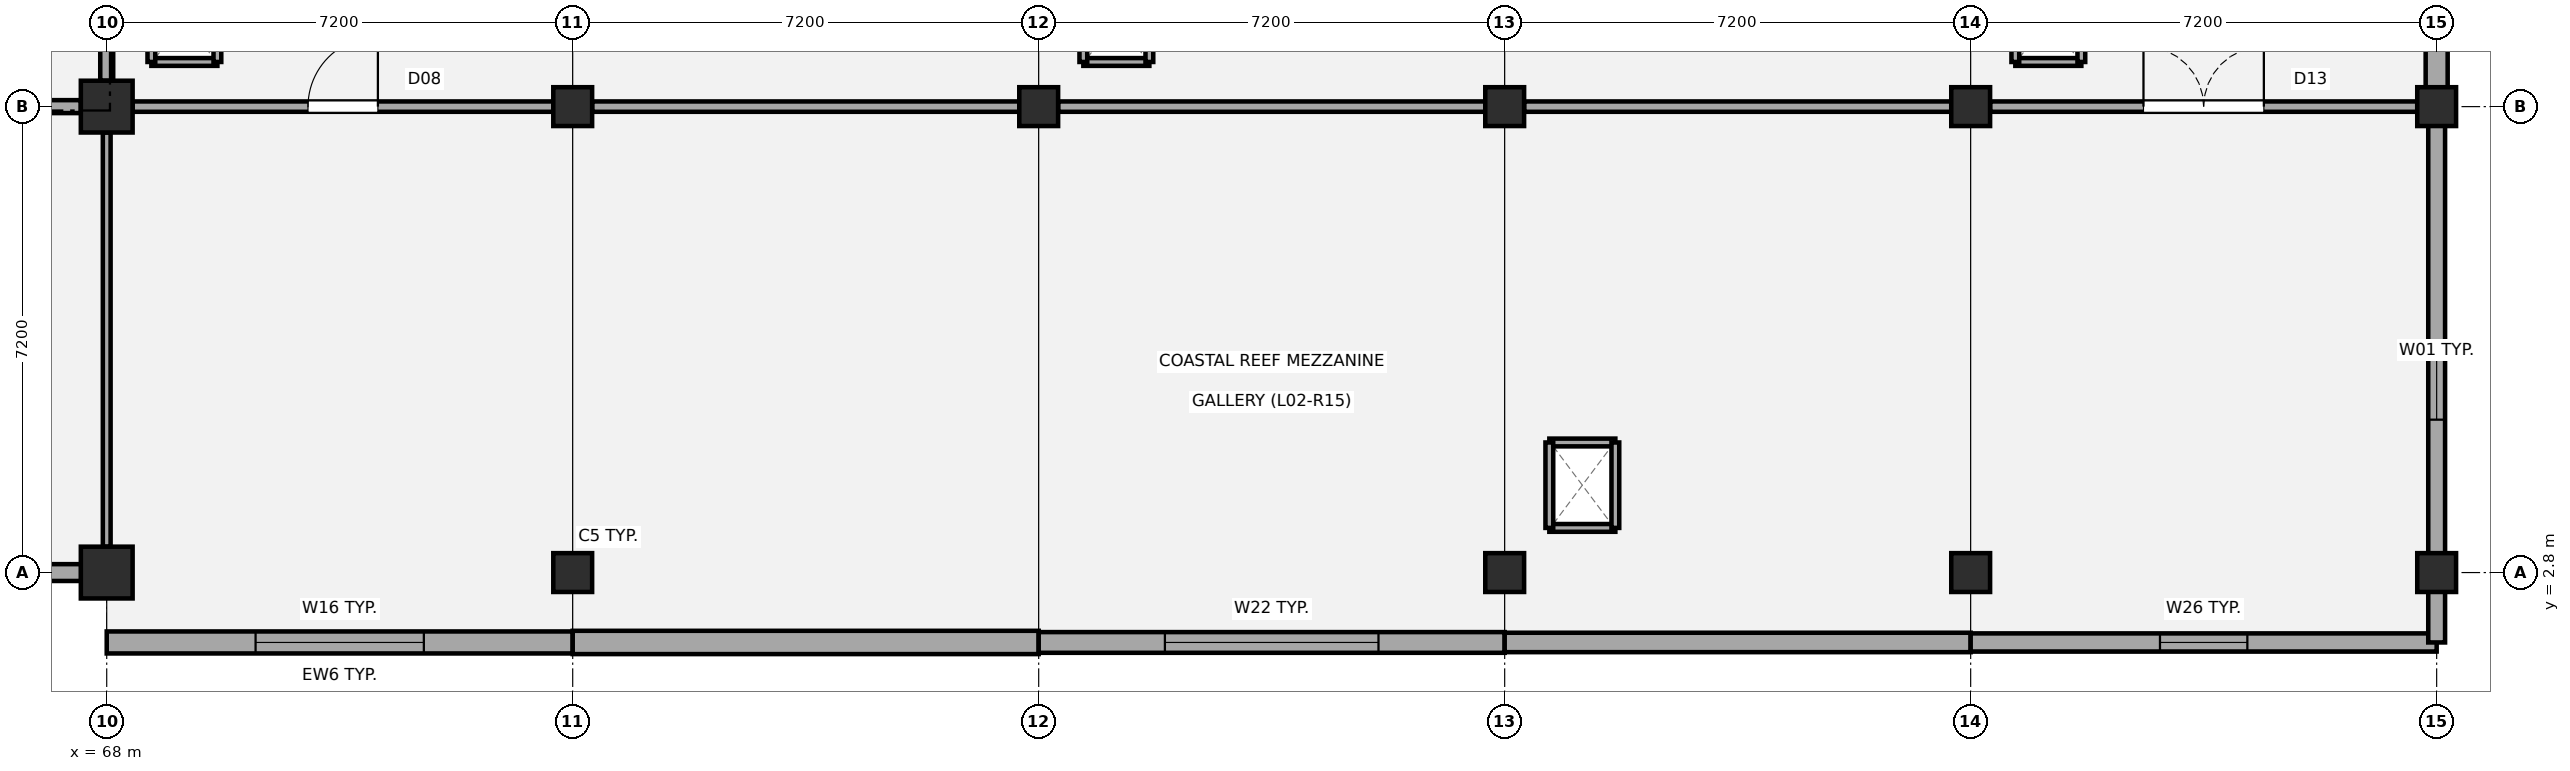
"""IFC4 building model, lengths in metres.
Left out: names, types, materials, properties, quantities, classifications, styles, units other than length and angle.
Written with IfcOpenShell. Run it as: python <this file> out.ifc"""

import sys

from ifc_helpers import new_model, si_unit, direction, frame, frame_2d, origin, origin_2d, place, context, subcontext, project, spatial, rectangle, extrude, element, fill, save


model = new_model("IFC4")
c1 = context("Model", 3, precision=1e-05, world=origin(), true_north=direction((0.0, 1.0)))
c2 = subcontext(c1, "Body", "Model", "MODEL_VIEW")
j1 = project(units=[si_unit("LENGTHUNIT", "METRE"), si_unit("PLANEANGLEUNIT", "RADIAN")], contexts=[c1])
p1 = place(None, origin())
s1 = spatial("IfcSite", under=j1, at=p1, CompositionType="ELEMENT")
p2 = place(p1, origin())
s2 = spatial("IfcBuilding", under=s1, at=p2, CompositionType="ELEMENT")
p3 = place(p2, frame((0.0, 0.0, 9.18)))
s3 = spatial("IfcBuildingStorey", under=s2, at=p3, CompositionType="ELEMENT", Elevation=9.18)
for number, where, z_axis, x_axis in (
    (1, (68.0, 2.8, 0.0), (0.0, 0.0, 1.0), (1.0, 0.0, 0.0)),
    (2, (68.0, 10.0, 0.0), (0.0, 0.0, 1.0), (1.0, 0.0, 0.0)),
):
    element("IfcColumn", number, at=place(p3, frame(where, z_axis=z_axis, x_axis=x_axis)), inside=s3, PredefinedType="COLUMN", context=c2, shape_type="SweptSolid", body=[
        extrude(rectangle(XDim=0.8, YDim=0.8, at=origin_2d()), origin(), (0.0, 0.0, 1.0), 4.32),
    ])
for number, where, z_axis, x_axis in (
    (3, (75.2, 2.8, 0.0), (0.0, 0.0, 1.0), (1.0, 0.0, 0.0)),
    (4, (75.2, 10.0, 0.0), (0.0, 0.0, 1.0), (1.0, 0.0, 0.0)),
    (5, (82.4, 10.0, 0.0), (0.0, 0.0, 1.0), (1.0, 0.0, 0.0)),
    (6, (89.6, 2.8, 0.0), (0.0, 0.0, 1.0), (1.0, 0.0, 0.0)),
    (7, (89.6, 10.0, 0.0), (0.0, 0.0, 1.0), (1.0, 0.0, 0.0)),
    (8, (96.8, 2.8, 0.0), (0.0, 0.0, 1.0), (1.0, 0.0, 0.0)),
    (9, (96.8, 10.0, 0.0), (0.0, 0.0, 1.0), (1.0, 0.0, 0.0)),
    (10, (104.0, 2.8, 0.0), (0.0, 0.0, 1.0), (1.0, 0.0, 0.0)),
    (11, (104.0, 10.0, 0.0), (0.0, 0.0, 1.0), (1.0, 0.0, 0.0)),
):
    element("IfcColumn", number, at=place(p3, frame(where, z_axis=z_axis, x_axis=x_axis)), inside=s3, PredefinedType="COLUMN", context=c2, shape_type="SweptSolid", body=[
        extrude(rectangle(XDim=0.6, YDim=0.6, at=origin_2d()), origin(), (0.0, 0.0, 1.0), 4.32),
    ])
p4 = place(p3, frame((67.605, 2.8, 0.0), z_axis=(0.0, 0.0, 1.0), x_axis=(-1.0, 0.0, 0.0)))
e12 = element("IfcWall", 12, at=p4, inside=s3, PredefinedType="STANDARD", context=c2, shape_type="SweptSolid", body=[
    extrude(rectangle(XDim=6.41, YDim=0.26, at=frame_2d((3.205, 0.0))), origin(), (0.0, 0.0, 1.0), 3.46),
])
p5 = place(p3, frame((75.2, 1.72, 0.0), z_axis=(0.0, 0.0, 1.0), x_axis=(-1.0, 0.0, 0.0)))
e13 = element("IfcWall", 13, at=p5, inside=s3, PredefinedType="STANDARD", context=c2, shape_type="SweptSolid", body=[
    extrude(rectangle(XDim=7.2, YDim=0.34, at=frame_2d((3.6, 0.0))), origin(), (0.0, 0.0, 1.0), 4.03),
])
p6 = place(p5, frame((2.3, 0.0, 0.95)))
e14 = element("IfcOpeningElement", 14, at=p6, cuts=e13, PredefinedType="OPENING", context=c2, shape_type="SweptSolid", body=[
    extrude(rectangle(XDim=2.6, YDim=1.65, at=frame_2d((1.3, 0.825))), frame((0.0, 0.18, 0.0), z_axis=(0.0, -1.0, 0.0), x_axis=(1.0, 0.0, 0.0)), (0.0, 0.0, 1.0), 0.36),
])
p7 = place(p3, frame((82.4, 1.72, 0.0), z_axis=(0.0, 0.0, 1.0), x_axis=(-1.0, 0.0, 0.0)))
e15 = element("IfcWall", 15, at=p7, inside=s3, PredefinedType="STANDARD", context=c2, shape_type="SweptSolid", body=[
    extrude(rectangle(XDim=7.2, YDim=0.36, at=frame_2d((3.6, 0.0))), origin(), (0.0, 0.0, 1.0), 4.03),
])
p8 = place(p3, frame((89.6, 1.72, 0.0), z_axis=(0.0, 0.0, 1.0), x_axis=(-1.0, 0.0, 0.0)))
e16 = element("IfcWall", 16, at=p8, inside=s3, PredefinedType="STANDARD", context=c2, shape_type="SweptSolid", body=[
    extrude(rectangle(XDim=7.2, YDim=0.32, at=frame_2d((3.6, 0.0))), origin(), (0.0, 0.0, 1.0), 4.03),
])
p9 = place(p8, frame((1.95, 0.0, 0.95)))
e17 = element("IfcOpeningElement", 17, at=p9, cuts=e16, PredefinedType="OPENING", context=c2, shape_type="SweptSolid", body=[
    extrude(rectangle(XDim=3.3, YDim=1.95, at=frame_2d((1.65, 0.975))), frame((0.0, 0.17, 0.0), z_axis=(0.0, -1.0, 0.0), x_axis=(1.0, 0.0, 0.0)), (0.0, 0.0, 1.0), 0.34),
])
p10 = place(p3, frame((96.8, 1.72, 0.0), z_axis=(0.0, 0.0, 1.0), x_axis=(-1.0, 0.0, 0.0)))
e18 = element("IfcWall", 18, at=p10, inside=s3, PredefinedType="STANDARD", context=c2, shape_type="SweptSolid", body=[
    extrude(rectangle(XDim=7.2, YDim=0.3, at=frame_2d((3.6, 0.0))), origin(), (0.0, 0.0, 1.0), 4.03),
])
p11 = place(p3, frame((104.0, 1.72, 0.0), z_axis=(0.0, 0.0, 1.0), x_axis=(-1.0, 0.0, 0.0)))
e19 = element("IfcWall", 19, at=p11, inside=s3, PredefinedType="STANDARD", context=c2, shape_type="SweptSolid", body=[
    extrude(rectangle(XDim=7.2, YDim=0.28, at=frame_2d((3.6, 0.0))), origin(), (0.0, 0.0, 1.0), 4.03),
])
p12 = place(p11, frame((2.925, 0.0, 0.95)))
e20 = element("IfcOpeningElement", 20, at=p12, cuts=e19, PredefinedType="OPENING", context=c2, shape_type="SweptSolid", body=[
    extrude(rectangle(XDim=1.35, YDim=1.2, at=frame_2d((0.675, 0.6))), frame((0.0, 0.15, 0.0), z_axis=(0.0, -1.0, 0.0), x_axis=(1.0, 0.0, 0.0)), (0.0, 0.0, 1.0), 0.3),
])
p13 = place(p3, frame((104.0, 9.705, 0.0), z_axis=(0.0, 0.0, 1.0), x_axis=(0.0, -1.0, 0.0)))
e21 = element("IfcWall", 21, at=p13, inside=s3, PredefinedType="STANDARD", context=c2, shape_type="SweptSolid", body=[
    extrude(rectangle(XDim=7.985, YDim=0.26, at=frame_2d((3.993, 0.0))), origin(), (0.0, 0.0, 1.0), 3.48),
])
p14 = place(p13, frame((3.442, 0.0, 0.95)))
e22 = element("IfcOpeningElement", 22, at=p14, cuts=e21, PredefinedType="OPENING", context=c2, shape_type="SweptSolid", body=[
    extrude(rectangle(XDim=1.1, YDim=1.4, at=frame_2d((0.55, 0.7))), frame((0.0, 0.14, 0.0), z_axis=(0.0, -1.0, 0.0), x_axis=(1.0, 0.0, 0.0)), (0.0, 0.0, 1.0), 0.28),
])
p15 = place(p3, frame((104.0, 16.905, 0.0), z_axis=(0.0, 0.0, 1.0), x_axis=(0.0, -1.0, 0.0)))
e23 = element("IfcWall", 23, at=p15, inside=s3, PredefinedType="STANDARD", context=c2, shape_type="SweptSolid", body=[
    extrude(rectangle(XDim=6.61, YDim=0.34, at=frame_2d((3.305, 0.0))), origin(), (0.0, 0.0, 1.0), 3.48),
])
p16 = place(p15, frame((2.705, 0.0, 0.95)))
e24 = element("IfcOpeningElement", 24, at=p16, cuts=e23, PredefinedType="OPENING", context=c2, shape_type="SweptSolid", body=[
    extrude(rectangle(XDim=1.2, YDim=1.5, at=frame_2d((0.6, 0.75))), frame((0.0, 0.18, 0.0), z_axis=(0.0, -1.0, 0.0), x_axis=(1.0, 0.0, 0.0)), (0.0, 0.0, 1.0), 0.36),
])
p17 = place(p3, frame((68.0, 10.4, 0.0), z_axis=(0.0, 0.0, 1.0), x_axis=(0.0, 1.0, 0.0)))
e25 = element("IfcWall", 25, at=p17, inside=s3, PredefinedType="PARTITIONING", context=c2, shape_type="SweptSolid", body=[
    extrude(rectangle(XDim=6.4, YDim=0.2, at=frame_2d((3.2, 0.0))), origin(), (0.0, 0.0, 1.0), 3.43),
])
p18 = place(p17, frame((2.69, 0.0, 0.0)))
e26 = element("IfcOpeningElement", 26, at=p18, cuts=e25, PredefinedType="OPENING", context=c2, shape_type="SweptSolid", body=[
    extrude(rectangle(XDim=1.02, YDim=2.15, at=frame_2d((0.51, 1.075))), frame((0.0, 0.11, 0.0), z_axis=(0.0, -1.0, 0.0), x_axis=(1.0, 0.0, 0.0)), (0.0, 0.0, 1.0), 0.22),
])
p19 = place(p3, frame((65.34, 10.0, 0.0), z_axis=(0.0, 0.0, 1.0), x_axis=(1.0, 0.0, 0.0)))
e27 = element("IfcWall", 27, at=p19, inside=s3, PredefinedType="PARTITIONING", context=c2, shape_type="SweptSolid", body=[
    extrude(rectangle(XDim=2.26, YDim=0.2, at=frame_2d((1.13, 0.0))), origin(), (0.0, 0.0, 1.0), 3.41),
])
p20 = place(p3, frame((68.69, 10.69, 0.0), z_axis=(0.0, 0.0, 1.0), x_axis=(1.0, 0.0, 0.0)))
e28 = element("IfcWall", 28, at=p20, inside=s3, PredefinedType="PARTITIONING", context=c2, shape_type="SweptSolid", body=[
    extrude(rectangle(XDim=1.02, YDim=0.12, at=frame_2d((0.51, 0.0))), origin(), (0.0, 0.0, 1.0), 4.02),
])
for number, where, z_axis, x_axis in (
    (29, (68.69, 10.69, 0.0), (0.0, 0.0, 1.0), (0.0, 1.0, 0.0)),
    (30, (69.71, 10.69, 0.0), (0.0, 0.0, 1.0), (0.0, 1.0, 0.0)),
):
    element("IfcWall", number, at=place(p3, frame(where, z_axis=z_axis, x_axis=x_axis)), inside=s3, PredefinedType="PARTITIONING", context=c2, shape_type="SweptSolid", body=[
        extrude(rectangle(XDim=1.32, YDim=0.12, at=frame_2d((0.66, 0.0))), origin(), (0.0, 0.0, 1.0), 4.02),
    ])
p21 = place(p3, frame((83.09, 10.69, 0.0), z_axis=(0.0, 0.0, 1.0), x_axis=(1.0, 0.0, 0.0)))
e31 = element("IfcWall", 31, at=p21, inside=s3, PredefinedType="PARTITIONING", context=c2, shape_type="SweptSolid", body=[
    extrude(rectangle(XDim=1.02, YDim=0.12, at=frame_2d((0.51, 0.0))), origin(), (0.0, 0.0, 1.0), 4.02),
])
for number, where, z_axis, x_axis in (
    (32, (83.09, 10.69, 0.0), (0.0, 0.0, 1.0), (0.0, 1.0, 0.0)),
    (33, (84.11, 10.69, 0.0), (0.0, 0.0, 1.0), (0.0, 1.0, 0.0)),
):
    element("IfcWall", number, at=place(p3, frame(where, z_axis=z_axis, x_axis=x_axis)), inside=s3, PredefinedType="PARTITIONING", context=c2, shape_type="SweptSolid", body=[
        extrude(rectangle(XDim=1.32, YDim=0.12, at=frame_2d((0.66, 0.0))), origin(), (0.0, 0.0, 1.0), 4.02),
    ])
for number, where, z_axis, x_axis in (
    (34, (90.29, 3.49, 0.0), (0.0, 0.0, 1.0), (1.0, 0.0, 0.0)),
    (35, (90.29, 4.81, 0.0), (0.0, 0.0, 1.0), (1.0, 0.0, 0.0)),
):
    element("IfcWall", number, at=place(p3, frame(where, z_axis=z_axis, x_axis=x_axis)), inside=s3, PredefinedType="PARTITIONING", context=c2, shape_type="SweptSolid", body=[
        extrude(rectangle(XDim=1.02, YDim=0.12, at=frame_2d((0.51, 0.0))), origin(), (0.0, 0.0, 1.0), 4.02),
    ])
for number, where, z_axis, x_axis in (
    (36, (90.29, 3.49, 0.0), (0.0, 0.0, 1.0), (0.0, 1.0, 0.0)),
    (37, (91.31, 3.49, 0.0), (0.0, 0.0, 1.0), (0.0, 1.0, 0.0)),
):
    element("IfcWall", number, at=place(p3, frame(where, z_axis=z_axis, x_axis=x_axis)), inside=s3, PredefinedType="PARTITIONING", context=c2, shape_type="SweptSolid", body=[
        extrude(rectangle(XDim=1.32, YDim=0.12, at=frame_2d((0.66, 0.0))), origin(), (0.0, 0.0, 1.0), 4.02),
    ])
p22 = place(p3, frame((97.49, 10.69, 0.0), z_axis=(0.0, 0.0, 1.0), x_axis=(1.0, 0.0, 0.0)))
e38 = element("IfcWall", 38, at=p22, inside=s3, PredefinedType="PARTITIONING", context=c2, shape_type="SweptSolid", body=[
    extrude(rectangle(XDim=1.02, YDim=0.12, at=frame_2d((0.51, 0.0))), origin(), (0.0, 0.0, 1.0), 4.02),
])
for number, where, z_axis, x_axis in (
    (39, (97.49, 10.69, 0.0), (0.0, 0.0, 1.0), (0.0, 1.0, 0.0)),
    (40, (98.51, 10.69, 0.0), (0.0, 0.0, 1.0), (0.0, 1.0, 0.0)),
):
    element("IfcWall", number, at=place(p3, frame(where, z_axis=z_axis, x_axis=x_axis)), inside=s3, PredefinedType="PARTITIONING", context=c2, shape_type="SweptSolid", body=[
        extrude(rectangle(XDim=1.32, YDim=0.12, at=frame_2d((0.66, 0.0))), origin(), (0.0, 0.0, 1.0), 4.02),
    ])
p23 = place(p3, frame((68.0, 3.2, 0.0), z_axis=(0.0, 0.0, 1.0), x_axis=(0.0, 1.0, 0.0)))
e41 = element("IfcWall", 41, at=p23, inside=s3, PredefinedType="PARTITIONING", context=c2, shape_type="SweptSolid", body=[
    extrude(rectangle(XDim=6.4, YDim=0.12, at=frame_2d((3.2, 0.0))), origin(), (0.0, 0.0, 1.0), 3.36),
])
p24 = place(p3, frame((68.4, 10.0, 0.0), z_axis=(0.0, 0.0, 1.0), x_axis=(1.0, 0.0, 0.0)))
e42 = element("IfcWall", 42, at=p24, inside=s3, PredefinedType="PARTITIONING", context=c2, shape_type="SweptSolid", body=[
    extrude(rectangle(XDim=6.5, YDim=0.16, at=frame_2d((3.25, 0.0))), origin(), (0.0, 0.0, 1.0), 3.38),
])
p25 = place(p24, frame((2.71, 0.0, 0.0)))
e43 = element("IfcOpeningElement", 43, at=p25, cuts=e42, PredefinedType="OPENING", context=c2, shape_type="SweptSolid", body=[
    extrude(rectangle(XDim=1.08, YDim=2.16, at=frame_2d((0.54, 1.08))), frame((0.0, 0.09, 0.0), z_axis=(0.0, -1.0, 0.0), x_axis=(1.0, 0.0, 0.0)), (0.0, 0.0, 1.0), 0.18),
])
p26 = place(p3, frame((75.5, 10.0, 0.0), z_axis=(0.0, 0.0, 1.0), x_axis=(1.0, 0.0, 0.0)))
e44 = element("IfcWall", 44, at=p26, inside=s3, PredefinedType="PARTITIONING", context=c2, shape_type="SweptSolid", body=[
    extrude(rectangle(XDim=6.6, YDim=0.16, at=frame_2d((3.3, 0.0))), origin(), (0.0, 0.0, 1.0), 3.43),
])
p27 = place(p3, frame((82.7, 10.0, 0.0), z_axis=(0.0, 0.0, 1.0), x_axis=(1.0, 0.0, 0.0)))
e45 = element("IfcWall", 45, at=p27, inside=s3, PredefinedType="PARTITIONING", context=c2, shape_type="SweptSolid", body=[
    extrude(rectangle(XDim=6.6, YDim=0.16, at=frame_2d((3.3, 0.0))), origin(), (0.0, 0.0, 1.0), 3.38),
])
p28 = place(p3, frame((89.9, 10.0, 0.0), z_axis=(0.0, 0.0, 1.0), x_axis=(1.0, 0.0, 0.0)))
e46 = element("IfcWall", 46, at=p28, inside=s3, PredefinedType="PARTITIONING", context=c2, shape_type="SweptSolid", body=[
    extrude(rectangle(XDim=6.6, YDim=0.16, at=frame_2d((3.3, 0.0))), origin(), (0.0, 0.0, 1.0), 3.43),
])
p29 = place(p3, frame((97.1, 10.0, 0.0), z_axis=(0.0, 0.0, 1.0), x_axis=(1.0, 0.0, 0.0)))
e47 = element("IfcWall", 47, at=p29, inside=s3, PredefinedType="PARTITIONING", context=c2, shape_type="SweptSolid", body=[
    extrude(rectangle(XDim=6.6, YDim=0.16, at=frame_2d((3.3, 0.0))), origin(), (0.0, 0.0, 1.0), 3.38),
])
p30 = place(p29, frame((2.37, 0.0, 0.0)))
e48 = element("IfcOpeningElement", 48, at=p30, cuts=e47, PredefinedType="OPENING", context=c2, shape_type="SweptSolid", body=[
    extrude(rectangle(XDim=1.86, YDim=2.26, at=frame_2d((0.93, 1.13))), frame((0.0, 0.09, 0.0), z_axis=(0.0, -1.0, 0.0), x_axis=(1.0, 0.0, 0.0)), (0.0, 0.0, 1.0), 0.18),
])
p31 = place(p6, origin())
e49 = element("IfcWindow", 49, at=p31, inside=s3, PartitioningType="SINGLE_PANEL", PredefinedType="WINDOW", context=c2, shape_type="SweptSolid", body=[
    extrude(rectangle(XDim=2.6, YDim=1.65, at=frame_2d((1.3, 0.825))), frame((0.0, 0.03, 0.0), z_axis=(0.0, -1.0, 0.0), x_axis=(1.0, 0.0, 0.0)), (0.0, 0.0, 1.0), 0.06),
])
fill(e14, e49)
p32 = place(p9, origin())
e50 = element("IfcWindow", 50, at=p32, inside=s3, PartitioningType="SINGLE_PANEL", PredefinedType="WINDOW", context=c2, shape_type="SweptSolid", body=[
    extrude(rectangle(XDim=3.3, YDim=1.95, at=frame_2d((1.65, 0.975))), frame((0.0, 0.03, 0.0), z_axis=(0.0, -1.0, 0.0), x_axis=(1.0, 0.0, 0.0)), (0.0, 0.0, 1.0), 0.06),
])
fill(e17, e50)
p33 = place(p12, origin())
e51 = element("IfcWindow", 51, at=p33, inside=s3, PartitioningType="SINGLE_PANEL", PredefinedType="WINDOW", context=c2, shape_type="SweptSolid", body=[
    extrude(rectangle(XDim=1.35, YDim=1.2, at=frame_2d((0.675, 0.6))), frame((0.0, 0.03, 0.0), z_axis=(0.0, -1.0, 0.0), x_axis=(1.0, 0.0, 0.0)), (0.0, 0.0, 1.0), 0.06),
])
fill(e20, e51)
p34 = place(p14, origin())
e52 = element("IfcWindow", 52, at=p34, inside=s3, PartitioningType="SINGLE_PANEL", PredefinedType="WINDOW", context=c2, shape_type="SweptSolid", body=[
    extrude(rectangle(XDim=1.1, YDim=1.4, at=frame_2d((0.55, 0.7))), frame((0.0, 0.03, 0.0), z_axis=(0.0, -1.0, 0.0), x_axis=(1.0, 0.0, 0.0)), (0.0, 0.0, 1.0), 0.06),
])
fill(e22, e52)
p35 = place(p25, origin())
e53 = element("IfcDoor", 53, at=p35, inside=s3, OperationType="SINGLE_SWING_RIGHT", PredefinedType="DOOR", context=c2, shape_type="SweptSolid", body=[
    extrude(rectangle(XDim=1.08, YDim=2.16, at=frame_2d((0.54, 1.08))), frame((0.0, 0.025, 0.0), z_axis=(0.0, -1.0, 0.0), x_axis=(1.0, 0.0, 0.0)), (0.0, 0.0, 1.0), 0.05),
])
fill(e43, e53)
p36 = place(p30, origin())
e54 = element("IfcDoor", 54, at=p36, inside=s3, OperationType="DOUBLE_DOOR_SINGLE_SWING", PredefinedType="DOOR", context=c2, shape_type="SweptSolid", body=[
    extrude(rectangle(XDim=1.86, YDim=2.26, at=frame_2d((0.93, 1.13))), frame((0.0, 0.025, 0.0), z_axis=(0.0, -1.0, 0.0), x_axis=(1.0, 0.0, 0.0)), (0.0, 0.0, 1.0), 0.05),
])
fill(e48, e54)
save(model, sys.argv[1])
